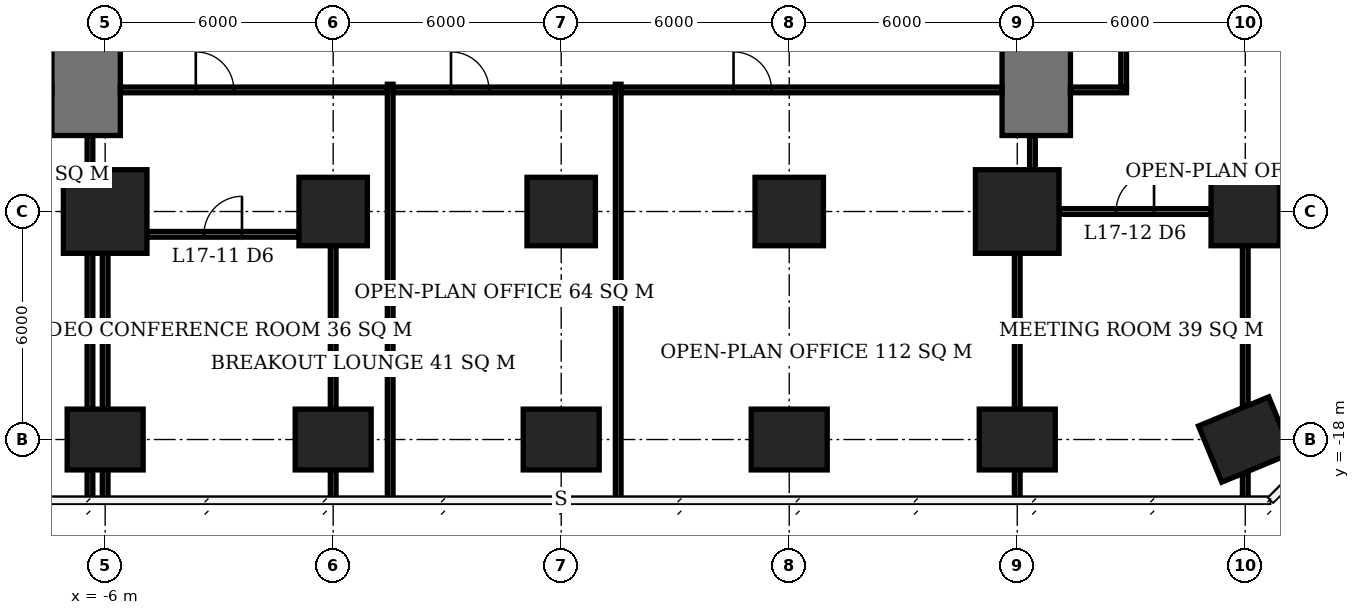
"""IFC4 building model, lengths in metres.
Left out: names, types, materials, properties, quantities, classifications, styles, units other than length and angle.
Written with IfcOpenShell. Run it as: python <this file> out.ifc"""

import sys

from ifc_helpers import new_model, si_unit, direction, frame, frame_2d, origin, origin_2d, place, context, subcontext, project, spatial, rectangle, extrude, element, fill, save


model = new_model("IFC4")
c1 = context("Model", 3, precision=1e-05, world=origin(), true_north=direction((0.0, 1.0)))
c2 = subcontext(c1, "Body", "Model", "MODEL_VIEW")
j1 = project(units=[si_unit("LENGTHUNIT", "METRE"), si_unit("PLANEANGLEUNIT", "RADIAN")], contexts=[c1])
p1 = place(None, origin())
s1 = spatial("IfcSite", under=j1, at=p1, CompositionType="ELEMENT")
p2 = place(p1, origin())
s2 = spatial("IfcBuilding", under=s1, at=p2, CompositionType="ELEMENT")
p3 = place(p2, frame((0.0, 0.0, 72.8)))
s3 = spatial("IfcBuildingStorey", under=s2, at=p3, CompositionType="ELEMENT", Elevation=72.8)
p4 = place(p3, frame((-6.0, -18.0, 0.0), z_axis=(0.0, 0.0, 1.0), x_axis=(1.0, 0.0, 0.0)))
e1 = element("IfcColumn", 1, at=p4, inside=s3, PredefinedType="COLUMN", context=c2, shape_type="SweptSolid", body=[
    extrude(rectangle(XDim=2.0, YDim=1.6, at=origin_2d()), origin(), (0.0, 0.0, 1.0), 3.9),
])
p5 = place(p3, frame((-6.0, -12.0, 0.0), z_axis=(0.0, 0.0, 1.0), x_axis=(1.0, 0.0, 0.0)))
e2 = element("IfcColumn", 2, at=p5, inside=s3, PredefinedType="COLUMN", context=c2, shape_type="SweptSolid", body=[
    extrude(rectangle(XDim=2.2, YDim=2.2, at=origin_2d()), origin(), (0.0, 0.0, 1.0), 3.9),
])
p6 = place(p3, frame((0.0, -18.0, 0.0), z_axis=(0.0, 0.0, 1.0), x_axis=(1.0, 0.0, 0.0)))
e3 = element("IfcColumn", 3, at=p6, inside=s3, PredefinedType="COLUMN", context=c2, shape_type="SweptSolid", body=[
    extrude(rectangle(XDim=2.0, YDim=1.6, at=origin_2d()), origin(), (0.0, 0.0, 1.0), 3.9),
])
p7 = place(p3, frame((0.0, -12.0, 0.0), z_axis=(0.0, 0.0, 1.0), x_axis=(1.0, 0.0, 0.0)))
e4 = element("IfcColumn", 4, at=p7, inside=s3, PredefinedType="COLUMN", context=c2, shape_type="SweptSolid", body=[
    extrude(rectangle(XDim=1.8, YDim=1.8, at=origin_2d()), origin(), (0.0, 0.0, 1.0), 3.9),
])
p8 = place(p3, frame((6.0, -18.0, 0.0), z_axis=(0.0, 0.0, 1.0), x_axis=(1.0, 0.0, 0.0)))
e5 = element("IfcColumn", 5, at=p8, inside=s3, PredefinedType="COLUMN", context=c2, shape_type="SweptSolid", body=[
    extrude(rectangle(XDim=2.0, YDim=1.6, at=origin_2d()), origin(), (0.0, 0.0, 1.0), 3.9),
])
p9 = place(p3, frame((6.0, -12.0, 0.0), z_axis=(0.0, 0.0, 1.0), x_axis=(1.0, 0.0, 0.0)))
e6 = element("IfcColumn", 6, at=p9, inside=s3, PredefinedType="COLUMN", context=c2, shape_type="SweptSolid", body=[
    extrude(rectangle(XDim=1.8, YDim=1.8, at=origin_2d()), origin(), (0.0, 0.0, 1.0), 3.9),
])
p10 = place(p3, frame((12.0, -18.0, 0.0), z_axis=(0.0, 0.0, 1.0), x_axis=(1.0, 0.0, 0.0)))
e7 = element("IfcColumn", 7, at=p10, inside=s3, PredefinedType="COLUMN", context=c2, shape_type="SweptSolid", body=[
    extrude(rectangle(XDim=2.0, YDim=1.6, at=origin_2d()), origin(), (0.0, 0.0, 1.0), 3.9),
])
p11 = place(p3, frame((12.0, -12.0, 0.0), z_axis=(0.0, 0.0, 1.0), x_axis=(1.0, 0.0, 0.0)))
e8 = element("IfcColumn", 8, at=p11, inside=s3, PredefinedType="COLUMN", context=c2, shape_type="SweptSolid", body=[
    extrude(rectangle(XDim=1.8, YDim=1.8, at=origin_2d()), origin(), (0.0, 0.0, 1.0), 3.9),
])
p12 = place(p3, frame((18.0, -18.0, 0.0), z_axis=(0.0, 0.0, 1.0), x_axis=(1.0, 0.0, 0.0)))
e9 = element("IfcColumn", 9, at=p12, inside=s3, PredefinedType="COLUMN", context=c2, shape_type="SweptSolid", body=[
    extrude(rectangle(XDim=2.0, YDim=1.6, at=origin_2d()), origin(), (0.0, 0.0, 1.0), 3.9),
])
p13 = place(p3, frame((18.0, -12.0, 0.0), z_axis=(0.0, 0.0, 1.0), x_axis=(1.0, 0.0, 0.0)))
e10 = element("IfcColumn", 10, at=p13, inside=s3, PredefinedType="COLUMN", context=c2, shape_type="SweptSolid", body=[
    extrude(rectangle(XDim=2.2, YDim=2.2, at=origin_2d()), origin(), (0.0, 0.0, 1.0), 3.9),
])
p14 = place(p3, frame((24.0, -18.0, 0.0), z_axis=(0.0, 0.0, 1.0), x_axis=(-0.923879532511, -0.382683432365, 0.0)))
e11 = element("IfcColumn", 11, at=p14, inside=s3, PredefinedType="COLUMN", context=c2, shape_type="SweptSolid", body=[
    extrude(rectangle(XDim=2.0, YDim=1.6, at=origin_2d()), origin(), (0.0, 0.0, 1.0), 3.9),
])
p15 = place(p3, frame((24.0, -12.0, 0.0), z_axis=(0.0, 0.0, 1.0), x_axis=(1.0, 0.0, 0.0)))
e12 = element("IfcColumn", 12, at=p15, inside=s3, PredefinedType="COLUMN", context=c2, shape_type="SweptSolid", body=[
    extrude(rectangle(XDim=1.8, YDim=1.8, at=origin_2d()), origin(), (0.0, 0.0, 1.0), 3.9),
])
for number, where, z_axis, x_axis in (
    (13, (-6.5, -10.0, 0.0), (0.0, 0.0, 1.0), (0.0, 1.0, 0.0)),
    (14, (18.5, -10.0, 0.0), (0.0, 0.0, 1.0), (0.0, 1.0, 0.0)),
):
    element("IfcWall", number, at=place(p3, frame(where, z_axis=z_axis, x_axis=x_axis)), inside=s3, PredefinedType="SHEAR", context=c2, shape_type="SweptSolid", body=[
        extrude(rectangle(XDim=2.4, YDim=1.8, at=frame_2d((1.2, 0.0))), origin(), (0.0, 0.0, 1.0), 3.9),
    ])
p16 = place(p3, frame((-4.9, -12.6, 0.0), z_axis=(0.0, 0.0, 1.0), x_axis=(1.0, 0.0, 0.0)))
e15 = element("IfcWall", 15, at=p16, inside=s3, PredefinedType="PARTITIONING", context=c2, shape_type="SweptSolid", body=[
    extrude(rectangle(XDim=4.0, YDim=0.15, at=frame_2d((2.0, 0.0))), origin(), (0.0, 0.0, 1.0), 3.65),
])
p17 = place(p16, frame((1.5, 0.0, 0.0)))
e16 = element("IfcOpeningElement", 16, at=p17, cuts=e15, PredefinedType="OPENING", context=c2, shape_type="SweptSolid", body=[
    extrude(rectangle(XDim=1.0, YDim=2.1, at=frame_2d((0.5, 1.05))), frame((0.0, 0.085, 0.0), z_axis=(0.0, -1.0, 0.0), x_axis=(1.0, 0.0, 0.0)), (0.0, 0.0, 1.0), 0.17),
])
p18 = place(p3, frame((19.1, -12.0, 0.0), z_axis=(0.0, 0.0, 1.0), x_axis=(1.0, 0.0, 0.0)))
e17 = element("IfcWall", 17, at=p18, inside=s3, PredefinedType="PARTITIONING", context=c2, shape_type="SweptSolid", body=[
    extrude(rectangle(XDim=4.0, YDim=0.15, at=frame_2d((2.0, 0.0))), origin(), (0.0, 0.0, 1.0), 3.65),
])
p19 = place(p18, frame((1.5, 0.0, 0.0)))
e18 = element("IfcOpeningElement", 18, at=p19, cuts=e17, PredefinedType="OPENING", context=c2, shape_type="SweptSolid", body=[
    extrude(rectangle(XDim=1.0, YDim=2.1, at=frame_2d((0.5, 1.05))), frame((0.0, 0.085, 0.0), z_axis=(0.0, -1.0, 0.0), x_axis=(1.0, 0.0, 0.0)), (0.0, 0.0, 1.0), 0.17),
])
p20 = place(p3, frame((-6.0, -19.6, 0.0), z_axis=(0.0, 0.0, 1.0), x_axis=(0.0, 1.0, 0.0)))
e19 = element("IfcWall", 19, at=p20, inside=s3, PredefinedType="PARTITIONING", context=c2, shape_type="SweptSolid", body=[
    extrude(rectangle(XDim=0.8, YDim=0.15, at=frame_2d((0.4, 0.0))), origin(), (0.0, 0.0, 1.0), 3.65),
])
p21 = place(p3, frame((-6.0, -17.2, 0.0), z_axis=(0.0, 0.0, 1.0), x_axis=(0.0, 1.0, 0.0)))
e20 = element("IfcWall", 20, at=p21, inside=s3, PredefinedType="PARTITIONING", context=c2, shape_type="SweptSolid", body=[
    extrude(rectangle(XDim=4.1, YDim=0.15, at=frame_2d((2.05, 0.0))), origin(), (0.0, 0.0, 1.0), 3.65),
])
p22 = place(p3, frame((0.0, -19.6, 0.0), z_axis=(0.0, 0.0, 1.0), x_axis=(0.0, 1.0, 0.0)))
e21 = element("IfcWall", 21, at=p22, inside=s3, PredefinedType="PARTITIONING", context=c2, shape_type="SweptSolid", body=[
    extrude(rectangle(XDim=0.8, YDim=0.15, at=frame_2d((0.4, 0.0))), origin(), (0.0, 0.0, 1.0), 3.65),
])
p23 = place(p3, frame((0.0, -17.2, 0.0), z_axis=(0.0, 0.0, 1.0), x_axis=(0.0, 1.0, 0.0)))
e22 = element("IfcWall", 22, at=p23, inside=s3, PredefinedType="PARTITIONING", context=c2, shape_type="SweptSolid", body=[
    extrude(rectangle(XDim=4.3, YDim=0.15, at=frame_2d((2.15, 0.0))), origin(), (0.0, 0.0, 1.0), 3.65),
])
p24 = place(p3, frame((18.0, -19.6, 0.0), z_axis=(0.0, 0.0, 1.0), x_axis=(0.0, 1.0, 0.0)))
e23 = element("IfcWall", 23, at=p24, inside=s3, PredefinedType="PARTITIONING", context=c2, shape_type="SweptSolid", body=[
    extrude(rectangle(XDim=0.8, YDim=0.15, at=frame_2d((0.4, 0.0))), origin(), (0.0, 0.0, 1.0), 3.65),
])
p25 = place(p3, frame((18.0, -17.2, 0.0), z_axis=(0.0, 0.0, 1.0), x_axis=(0.0, 1.0, 0.0)))
e24 = element("IfcWall", 24, at=p25, inside=s3, PredefinedType="PARTITIONING", context=c2, shape_type="SweptSolid", body=[
    extrude(rectangle(XDim=4.1, YDim=0.15, at=frame_2d((2.05, 0.0))), origin(), (0.0, 0.0, 1.0), 3.65),
])
p26 = place(p3, frame((24.0, -19.6, 0.0), z_axis=(0.0, 0.0, 1.0), x_axis=(0.0, 1.0, 0.0)))
e25 = element("IfcWall", 25, at=p26, inside=s3, PredefinedType="PARTITIONING", context=c2, shape_type="SweptSolid", body=[
    extrude(rectangle(XDim=0.703, YDim=0.15, at=frame_2d((0.352, 0.0))), origin(), (0.0, 0.0, 1.0), 3.65),
])
p27 = place(p3, frame((24.0, -17.103, 0.0), z_axis=(0.0, 0.0, 1.0), x_axis=(0.0, 1.0, 0.0)))
e26 = element("IfcWall", 26, at=p27, inside=s3, PredefinedType="PARTITIONING", context=c2, shape_type="SweptSolid", body=[
    extrude(rectangle(XDim=4.203, YDim=0.15, at=frame_2d((2.102, 0.0))), origin(), (0.0, 0.0, 1.0), 3.65),
])
p28 = place(p3, frame((-6.4, -19.55, 0.0), z_axis=(0.0, 0.0, 1.0), x_axis=(0.0, 1.0, 0.0)))
e27 = element("IfcWall", 27, at=p28, inside=s3, PredefinedType="PARTITIONING", context=c2, shape_type="SweptSolid", body=[
    extrude(rectangle(XDim=0.75, YDim=0.15, at=frame_2d((0.375, 0.0))), origin(), (0.0, 0.0, 1.0), 3.65),
])
p29 = place(p3, frame((-6.4, -17.2, 0.0), z_axis=(0.0, 0.0, 1.0), x_axis=(0.0, 1.0, 0.0)))
e28 = element("IfcWall", 28, at=p29, inside=s3, PredefinedType="PARTITIONING", context=c2, shape_type="SweptSolid", body=[
    extrude(rectangle(XDim=4.1, YDim=0.15, at=frame_2d((2.05, 0.0))), origin(), (0.0, 0.0, 1.0), 3.65),
])
p30 = place(p3, frame((-6.4, -10.9, 0.0), z_axis=(0.0, 0.0, 1.0), x_axis=(0.0, 1.0, 0.0)))
e29 = element("IfcWall", 29, at=p30, inside=s3, PredefinedType="PARTITIONING", context=c2, shape_type="SweptSolid", body=[
    extrude(rectangle(XDim=0.9, YDim=0.15, at=frame_2d((0.45, 0.0))), origin(), (0.0, 0.0, 1.0), 3.65),
])
p31 = place(p3, frame((-5.6, -8.8, 0.0), z_axis=(0.0, 0.0, 1.0), x_axis=(1.0, 0.0, 0.0)))
e30 = element("IfcWall", 30, at=p31, inside=s3, PredefinedType="PARTITIONING", context=c2, shape_type="SweptSolid", body=[
    extrude(rectangle(XDim=7.025, YDim=0.15, at=frame_2d((3.513, 0.0))), origin(), (0.0, 0.0, 1.0), 3.65),
])
p32 = place(p31, frame((1.985, 0.0, 0.0)))
e31 = element("IfcOpeningElement", 31, at=p32, cuts=e30, PredefinedType="OPENING", context=c2, shape_type="SweptSolid", body=[
    extrude(rectangle(XDim=1.0, YDim=2.1, at=frame_2d((0.5, 1.05))), frame((0.0, 0.085, 0.0), z_axis=(0.0, -1.0, 0.0), x_axis=(1.0, 0.0, 0.0)), (0.0, 0.0, 1.0), 0.17),
])
p33 = place(p3, frame((1.5, -19.6, 0.0), z_axis=(0.0, 0.0, 1.0), x_axis=(0.0, 1.0, 0.0)))
e32 = element("IfcWall", 32, at=p33, inside=s3, PredefinedType="PARTITIONING", context=c2, shape_type="SweptSolid", body=[
    extrude(rectangle(XDim=10.95, YDim=0.15, at=frame_2d((5.475, 0.0))), origin(), (0.0, 0.0, 1.0), 3.65),
])
p34 = place(p3, frame((1.575, -8.8, 0.0), z_axis=(0.0, 0.0, 1.0), x_axis=(1.0, 0.0, 0.0)))
e33 = element("IfcWall", 33, at=p34, inside=s3, PredefinedType="PARTITIONING", context=c2, shape_type="SweptSolid", body=[
    extrude(rectangle(XDim=5.85, YDim=0.15, at=frame_2d((2.925, 0.0))), origin(), (0.0, 0.0, 1.0), 3.65),
])
p35 = place(p34, frame((1.525, 0.0, 0.0)))
e34 = element("IfcOpeningElement", 34, at=p35, cuts=e33, PredefinedType="OPENING", context=c2, shape_type="SweptSolid", body=[
    extrude(rectangle(XDim=1.0, YDim=2.1, at=frame_2d((0.5, 1.05))), frame((0.0, 0.085, 0.0), z_axis=(0.0, -1.0, 0.0), x_axis=(1.0, 0.0, 0.0)), (0.0, 0.0, 1.0), 0.17),
])
p36 = place(p3, frame((7.5, -19.6, 0.0), z_axis=(0.0, 0.0, 1.0), x_axis=(0.0, 1.0, 0.0)))
e35 = element("IfcWall", 35, at=p36, inside=s3, PredefinedType="PARTITIONING", context=c2, shape_type="SweptSolid", body=[
    extrude(rectangle(XDim=10.95, YDim=0.15, at=frame_2d((5.475, 0.0))), origin(), (0.0, 0.0, 1.0), 3.65),
])
p37 = place(p3, frame((7.575, -8.8, 0.0), z_axis=(0.0, 0.0, 1.0), x_axis=(1.0, 0.0, 0.0)))
e36 = element("IfcWall", 36, at=p37, inside=s3, PredefinedType="PARTITIONING", context=c2, shape_type="SweptSolid", body=[
    extrude(rectangle(XDim=10.025, YDim=0.15, at=frame_2d((5.013, 0.0))), origin(), (0.0, 0.0, 1.0), 3.65),
])
p38 = place(p37, frame((2.96, 0.0, 0.0)))
e37 = element("IfcOpeningElement", 37, at=p38, cuts=e36, PredefinedType="OPENING", context=c2, shape_type="SweptSolid", body=[
    extrude(rectangle(XDim=1.0, YDim=2.1, at=frame_2d((0.5, 1.05))), frame((0.0, 0.085, 0.0), z_axis=(0.0, -1.0, 0.0), x_axis=(1.0, 0.0, 0.0)), (0.0, 0.0, 1.0), 0.17),
])
p39 = place(p3, frame((18.4, -10.9, 0.0), z_axis=(0.0, 0.0, 1.0), x_axis=(0.0, 1.0, 0.0)))
e38 = element("IfcWall", 38, at=p39, inside=s3, PredefinedType="PARTITIONING", context=c2, shape_type="SweptSolid", body=[
    extrude(rectangle(XDim=0.9, YDim=0.15, at=frame_2d((0.45, 0.0))), origin(), (0.0, 0.0, 1.0), 3.65),
])
p40 = place(p3, frame((19.4, -8.8, 0.0), z_axis=(0.0, 0.0, 1.0), x_axis=(1.0, 0.0, 0.0)))
e39 = element("IfcWall", 39, at=p40, inside=s3, PredefinedType="PARTITIONING", context=c2, shape_type="SweptSolid", body=[
    extrude(rectangle(XDim=1.475, YDim=0.15, at=frame_2d((0.738, 0.0))), origin(), (0.0, 0.0, 1.0), 3.65),
])
p41 = place(p3, frame((20.8, -8.725, 0.0), z_axis=(0.0, 0.0, 1.0), x_axis=(0.0, 1.0, 0.0)))
e40 = element("IfcWall", 40, at=p41, inside=s3, PredefinedType="PARTITIONING", context=c2, shape_type="SweptSolid", body=[
    extrude(rectangle(XDim=7.15, YDim=0.15, at=frame_2d((3.575, 0.0))), origin(), (0.0, 0.0, 1.0), 3.65),
])
p42 = place(p41, frame((1.98, 0.0, 0.0)))
e41 = element("IfcOpeningElement", 41, at=p42, cuts=e40, PredefinedType="OPENING", context=c2, shape_type="SweptSolid", body=[
    extrude(rectangle(XDim=1.0, YDim=2.1, at=frame_2d((0.5, 1.05))), frame((0.0, 0.085, 0.0), z_axis=(0.0, -1.0, 0.0), x_axis=(1.0, 0.0, 0.0)), (0.0, 0.0, 1.0), 0.17),
])
p43 = place(p17, origin())
e42 = element("IfcDoor", 42, at=p43, inside=s3, OperationType="SINGLE_SWING_RIGHT", PredefinedType="DOOR", context=c2, shape_type="SweptSolid", body=[
    extrude(rectangle(XDim=1.0, YDim=2.1, at=frame_2d((0.5, 1.05))), frame((0.0, 0.025, 0.0), z_axis=(0.0, -1.0, 0.0), x_axis=(1.0, 0.0, 0.0)), (0.0, 0.0, 1.0), 0.05),
])
fill(e16, e42)
p44 = place(p19, origin())
e43 = element("IfcDoor", 43, at=p44, inside=s3, OperationType="SINGLE_SWING_RIGHT", PredefinedType="DOOR", context=c2, shape_type="SweptSolid", body=[
    extrude(rectangle(XDim=1.0, YDim=2.1, at=frame_2d((0.5, 1.05))), frame((0.0, 0.025, 0.0), z_axis=(0.0, -1.0, 0.0), x_axis=(1.0, 0.0, 0.0)), (0.0, 0.0, 1.0), 0.05),
])
fill(e18, e43)
p45 = place(p35, origin())
e44 = element("IfcDoor", 44, at=p45, inside=s3, OperationType="SINGLE_SWING_LEFT", PredefinedType="DOOR", context=c2, shape_type="SweptSolid", body=[
    extrude(rectangle(XDim=1.0, YDim=2.1, at=frame_2d((0.5, 1.05))), frame((0.0, 0.025, 0.0), z_axis=(0.0, -1.0, 0.0), x_axis=(1.0, 0.0, 0.0)), (0.0, 0.0, 1.0), 0.05),
])
fill(e34, e44)
p46 = place(p38, origin())
e45 = element("IfcDoor", 45, at=p46, inside=s3, OperationType="SINGLE_SWING_LEFT", PredefinedType="DOOR", context=c2, shape_type="SweptSolid", body=[
    extrude(rectangle(XDim=1.0, YDim=2.1, at=frame_2d((0.5, 1.05))), frame((0.0, 0.025, 0.0), z_axis=(0.0, -1.0, 0.0), x_axis=(1.0, 0.0, 0.0)), (0.0, 0.0, 1.0), 0.05),
])
fill(e37, e45)
p47 = place(p32, origin())
e46 = element("IfcDoor", 46, at=p47, inside=s3, OperationType="SINGLE_SWING_LEFT", PredefinedType="DOOR", context=c2, shape_type="SweptSolid", body=[
    extrude(rectangle(XDim=1.0, YDim=2.1, at=frame_2d((0.5, 1.05))), frame((0.0, 0.025, 0.0), z_axis=(0.0, -1.0, 0.0), x_axis=(1.0, 0.0, 0.0)), (0.0, 0.0, 1.0), 0.05),
])
fill(e31, e46)
save(model, sys.argv[1])
